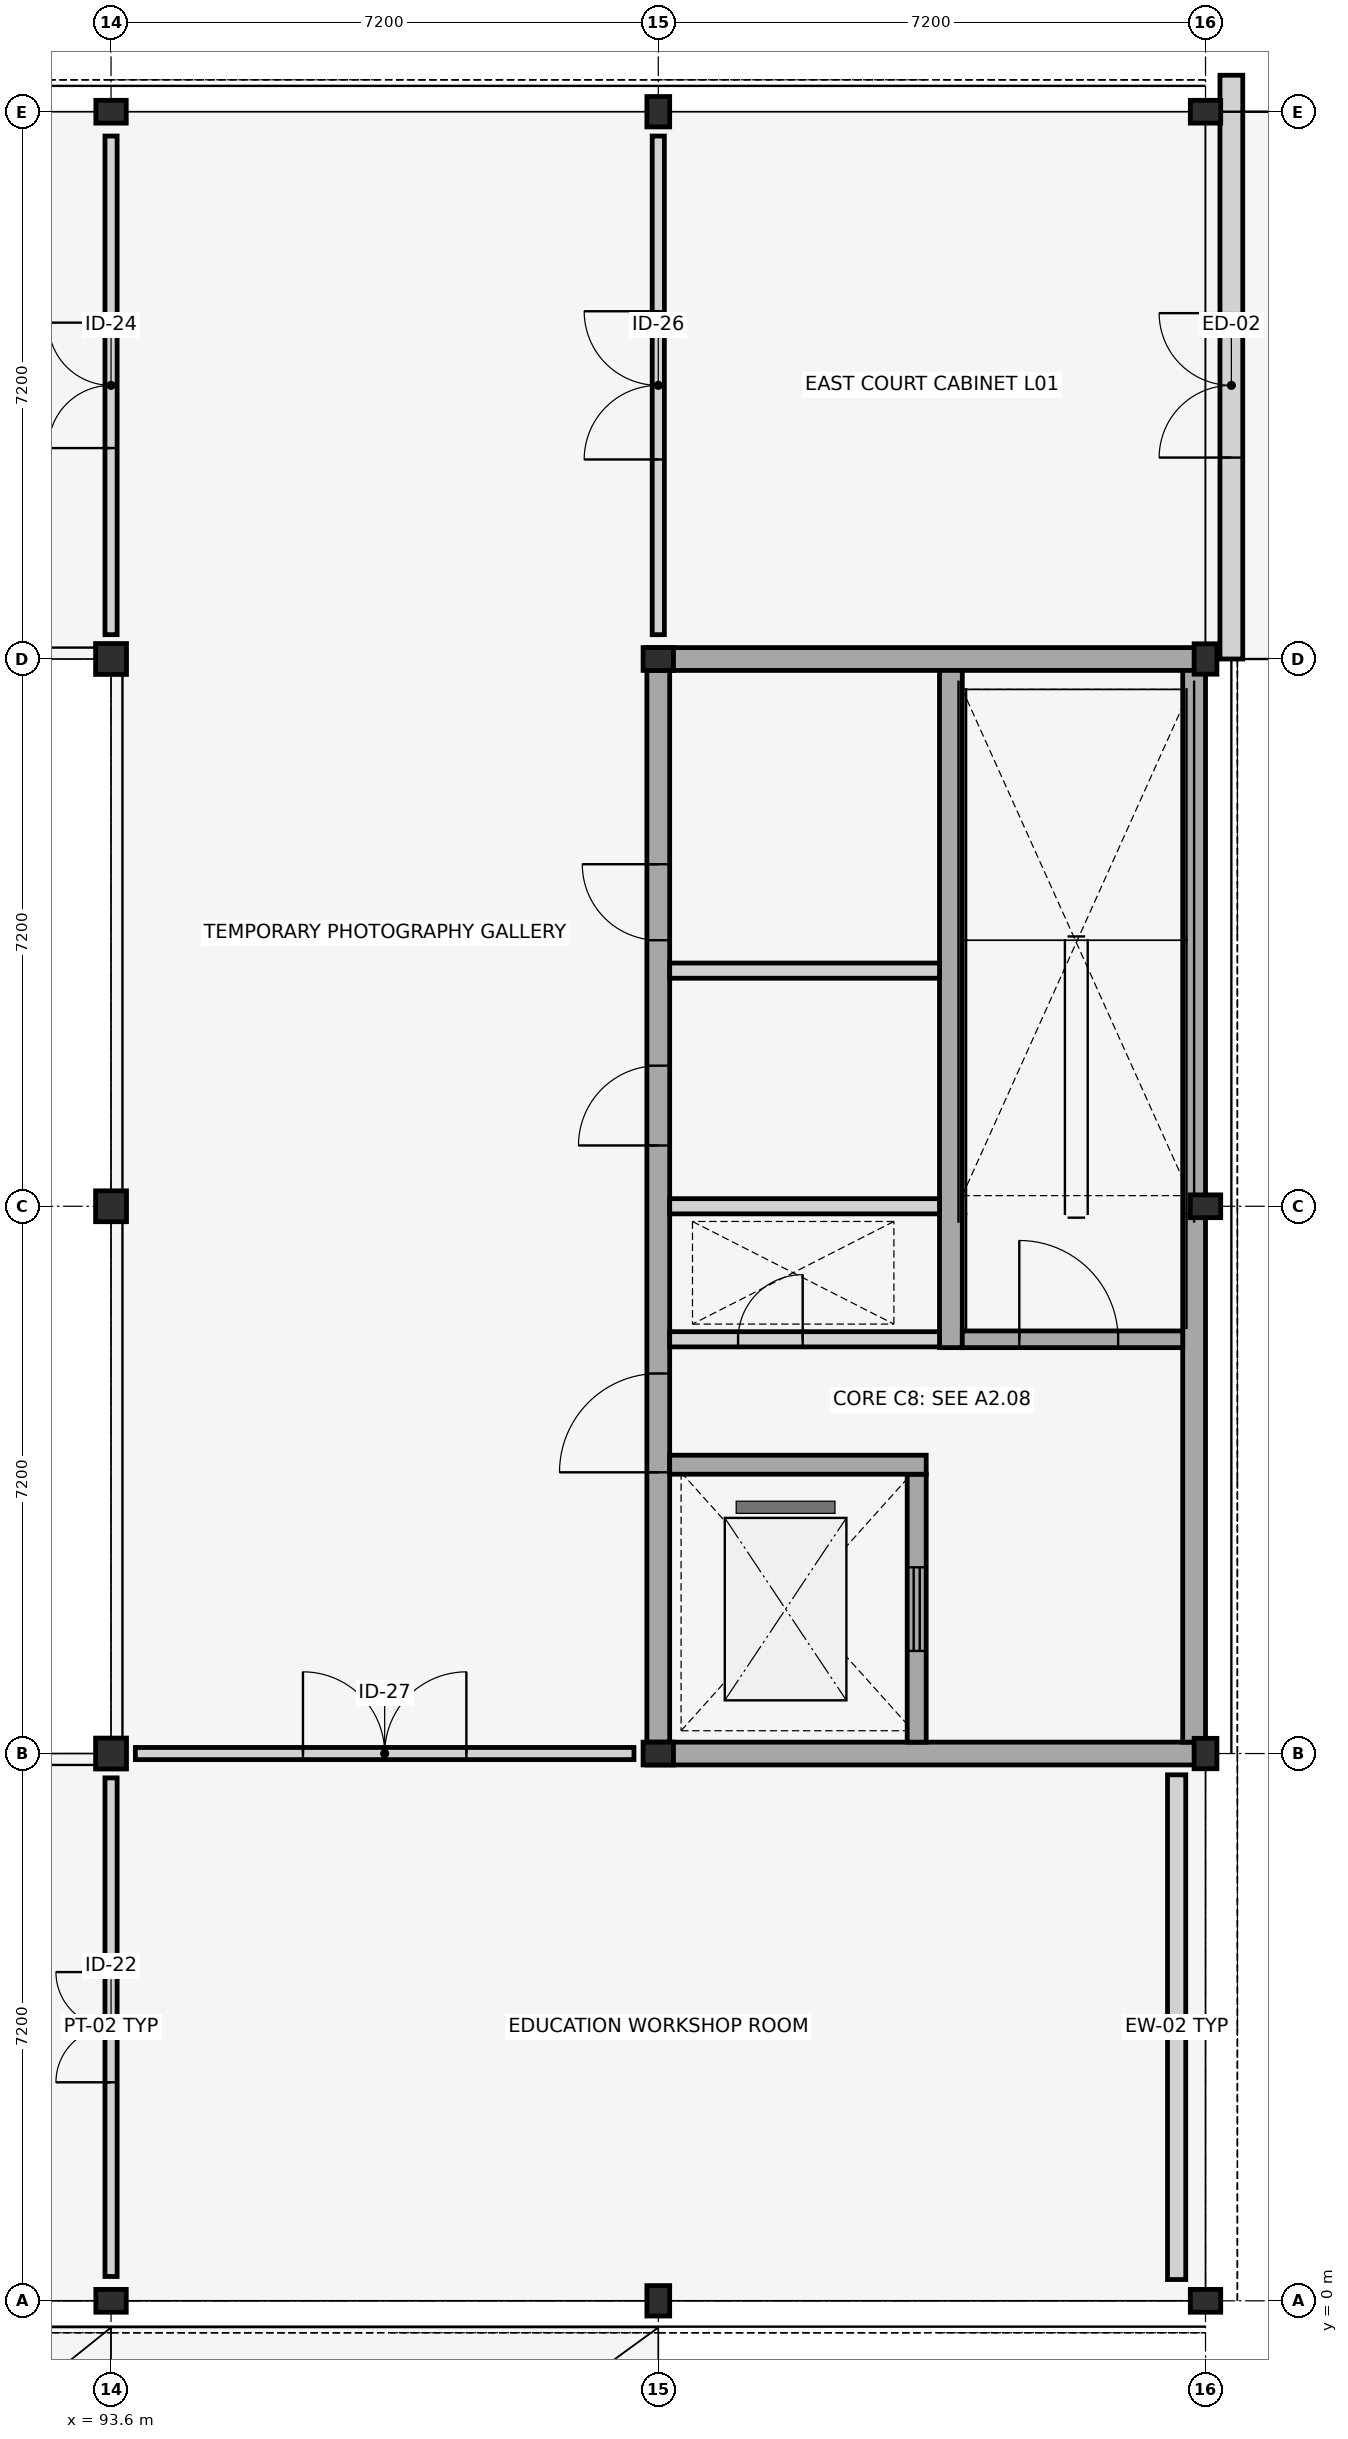
"""IFC4 building model, lengths in metres.
Left out: names, types, materials, properties, quantities, classifications, styles, units other than length and angle.
Written with IfcOpenShell. Run it as: python <this file> out.ifc"""

import sys

from ifc_helpers import new_model, si_unit, direction, frame, frame_2d, origin, origin_2d, place, context, subcontext, project, spatial, rectangle, hollow_circle, i_section, extrude, element, fill, save


model = new_model("IFC4")
c1 = context("Model", 3, precision=1e-05, world=origin(), true_north=direction((0.0, 1.0)))
c2 = subcontext(c1, "Body", "Model", "MODEL_VIEW")
j1 = project(units=[si_unit("LENGTHUNIT", "METRE"), si_unit("PLANEANGLEUNIT", "RADIAN")], contexts=[c1])
p1 = place(None, origin())
s1 = spatial("IfcSite", under=j1, at=p1, CompositionType="ELEMENT")
p2 = place(p1, origin())
s2 = spatial("IfcBuilding", under=s1, at=p2, CompositionType="ELEMENT")
p3 = place(p2, frame((0.0, 0.0, 4.5)))
s3 = spatial("IfcBuildingStorey", under=s2, at=p3, CompositionType="ELEMENT", Elevation=4.5)
p4 = place(p3, frame((93.6, 0.0, 0.0), z_axis=(0.0, 0.0, 1.0), x_axis=(0.0, 1.0, 0.0)))
e1 = element("IfcColumn", 1, at=p4, inside=s3, PredefinedType="COLUMN", context=c2, shape_type="SweptSolid", body=[
    extrude(i_section(OverallWidth=0.3, OverallDepth=0.4, WebThickness=0.013, FlangeThickness=0.024, FilletRadius=0.027, at=origin_2d()), origin(), (0.0, 0.0, 1.0), 4.2),
])
for number, where, z_axis, x_axis in (
    (2, (93.6, 7.2, 0.0), (0.0, 0.0, 1.0), (1.0, 0.0, 0.0)),
    (3, (93.6, 14.4, 0.0), (0.0, 0.0, 1.0), (0.0, 1.0, 0.0)),
    (4, (93.6, 21.6, 0.0), (0.0, 0.0, 1.0), (1.0, 0.0, 0.0)),
):
    element("IfcColumn", number, at=place(p3, frame(where, z_axis=z_axis, x_axis=x_axis)), inside=s3, PredefinedType="COLUMN", context=c2, shape_type="SweptSolid", body=[
        extrude(hollow_circle(Radius=0.203, WallThickness=0.016, at=origin_2d()), origin(), (0.0, 0.0, 1.0), 4.2),
    ])
for number, where, z_axis, x_axis in (
    (5, (93.6, 28.8, 0.0), (0.0, 0.0, 1.0), (0.0, 1.0, 0.0)),
    (6, (100.8, 0.0, 0.0), (0.0, 0.0, 1.0), (1.0, 0.0, 0.0)),
    (7, (100.8, 7.2, 0.0), (0.0, 0.0, 1.0), (0.0, 1.0, 0.0)),
    (8, (100.8, 21.6, 0.0), (0.0, 0.0, 1.0), (0.0, 1.0, 0.0)),
    (9, (100.8, 28.8, 0.0), (0.0, 0.0, 1.0), (1.0, 0.0, 0.0)),
    (10, (108.0, 0.0, 0.0), (0.0, 0.0, 1.0), (0.0, 1.0, 0.0)),
    (11, (108.0, 7.2, 0.0), (0.0, 0.0, 1.0), (1.0, 0.0, 0.0)),
    (12, (108.0, 14.4, 0.0), (0.0, 0.0, 1.0), (0.0, 1.0, 0.0)),
    (13, (108.0, 21.6, 0.0), (0.0, 0.0, 1.0), (1.0, 0.0, 0.0)),
    (14, (108.0, 28.8, 0.0), (0.0, 0.0, 1.0), (0.0, 1.0, 0.0)),
):
    element("IfcColumn", number, at=place(p3, frame(where, z_axis=z_axis, x_axis=x_axis)), inside=s3, PredefinedType="COLUMN", context=c2, shape_type="SweptSolid", body=[
        extrude(i_section(OverallWidth=0.3, OverallDepth=0.4, WebThickness=0.013, FlangeThickness=0.024, FilletRadius=0.027, at=origin_2d()), origin(), (0.0, 0.0, 1.0), 4.2),
    ])
p5 = place(p3, frame((107.62, 0.28, 0.0), z_axis=(0.0, 0.0, 1.0), x_axis=(0.0, 1.0, 0.0)))
e15 = element("IfcWall", 15, at=p5, inside=s3, PredefinedType="STANDARD", context=c2, shape_type="SweptSolid", body=[
    extrude(rectangle(XDim=6.64, YDim=0.24, at=frame_2d((3.32, 0.0))), origin(), (0.0, 0.0, 1.0), 3.58),
])
p6 = place(p3, frame((108.34, 21.6, 0.0), z_axis=(0.0, 0.0, 1.0), x_axis=(0.0, 1.0, 0.0)))
e16 = element("IfcWall", 16, at=p6, inside=s3, PredefinedType="STANDARD", context=c2, shape_type="SweptSolid", body=[
    extrude(rectangle(XDim=7.68, YDim=0.3, at=frame_2d((3.84, 0.0))), origin(), (0.0, 0.0, 1.0), 3.65),
])
p7 = place(p6, frame((2.65, 0.0, 0.0)))
e17 = element("IfcOpeningElement", 17, at=p7, cuts=e16, PredefinedType="OPENING", context=c2, shape_type="SweptSolid", body=[
    extrude(rectangle(XDim=1.9, YDim=2.45, at=frame_2d((0.95, 1.225))), frame((0.0, 0.16, 0.0), z_axis=(0.0, -1.0, 0.0), x_axis=(1.0, 0.0, 0.0)), (0.0, 0.0, 1.0), 0.32),
])
for number, where, z_axis, x_axis in (
    (18, (100.65, 7.2, 0.0), (0.0, 0.0, 1.0), (1.0, 0.0, 0.0)),
    (19, (100.65, 21.6, 0.0), (0.0, 0.0, 1.0), (1.0, 0.0, 0.0)),
):
    element("IfcWall", number, at=place(p3, frame(where, z_axis=z_axis, x_axis=x_axis)), inside=s3, PredefinedType="SHEAR", context=c2, shape_type="SweptSolid", body=[
        extrude(rectangle(XDim=7.35, YDim=0.3, at=frame_2d((3.675, 0.0))), origin(), (0.0, 0.0, 1.0), 3.98),
    ])
p8 = place(p3, frame((107.85, 7.35, 0.0), z_axis=(0.0, 0.0, 1.0), x_axis=(0.0, 1.0, 0.0)))
e20 = element("IfcWall", 20, at=p8, inside=s3, PredefinedType="SHEAR", context=c2, shape_type="SweptSolid", body=[
    extrude(rectangle(XDim=14.1, YDim=0.3, at=frame_2d((7.05, 0.0))), origin(), (0.0, 0.0, 1.0), 3.98),
])
p9 = place(p3, frame((100.8, 7.35, 0.0), z_axis=(0.0, 0.0, 1.0), x_axis=(0.0, 1.0, 0.0)))
e21 = element("IfcWall", 21, at=p9, inside=s3, PredefinedType="SHEAR", context=c2, shape_type="SweptSolid", body=[
    extrude(rectangle(XDim=14.1, YDim=0.3, at=frame_2d((7.05, 0.0))), origin(), (0.0, 0.0, 1.0), 3.98),
])
p10 = place(p9, frame((3.55, 0.0, 0.0)))
e22 = element("IfcOpeningElement", 22, at=p10, cuts=e21, PredefinedType="OPENING", context=c2, shape_type="SweptSolid", body=[
    extrude(rectangle(XDim=1.3, YDim=2.2, at=frame_2d((0.65, 1.1))), frame((0.0, 0.16, 0.0), z_axis=(0.0, -1.0, 0.0), x_axis=(1.0, 0.0, 0.0)), (0.0, 0.0, 1.0), 0.32),
])
p11 = place(p9, frame((7.85, 0.0, 0.0)))
e23 = element("IfcOpeningElement", 23, at=p11, cuts=e21, PredefinedType="OPENING", context=c2, shape_type="SweptSolid", body=[
    extrude(rectangle(XDim=1.05, YDim=2.15, at=frame_2d((0.525, 1.075))), frame((0.0, 0.16, 0.0), z_axis=(0.0, -1.0, 0.0), x_axis=(1.0, 0.0, 0.0)), (0.0, 0.0, 1.0), 0.32),
])
p12 = place(p9, frame((10.55, 0.0, 0.0)))
e24 = element("IfcOpeningElement", 24, at=p12, cuts=e21, PredefinedType="OPENING", context=c2, shape_type="SweptSolid", body=[
    extrude(rectangle(XDim=1.0, YDim=2.15, at=frame_2d((0.5, 1.075))), frame((0.0, 0.16, 0.0), z_axis=(0.0, -1.0, 0.0), x_axis=(1.0, 0.0, 0.0)), (0.0, 0.0, 1.0), 0.32),
])
p13 = place(p3, frame((104.2, 7.35, 0.0), z_axis=(0.0, 0.0, 1.0), x_axis=(0.0, 1.0, 0.0)))
e25 = element("IfcWall", 25, at=p13, inside=s3, PredefinedType="SHEAR", context=c2, shape_type="SweptSolid", body=[
    extrude(rectangle(XDim=3.525, YDim=0.25, at=frame_2d((1.762, 0.0))), origin(), (0.0, 0.0, 1.0), 3.98),
])
p14 = place(p13, frame((1.2, 0.0, 0.0)))
e26 = element("IfcOpeningElement", 26, at=p14, cuts=e25, PredefinedType="OPENING", context=c2, shape_type="SweptSolid", body=[
    extrude(rectangle(XDim=1.1, YDim=2.15, at=frame_2d((0.55, 1.075))), frame((0.0, 0.135, 0.0), z_axis=(0.0, -1.0, 0.0), x_axis=(1.0, 0.0, 0.0)), (0.0, 0.0, 1.0), 0.27),
])
p15 = place(p3, frame((104.65, 12.54, 0.0), z_axis=(0.0, 0.0, 1.0), x_axis=(0.0, 1.0, 0.0)))
e27 = element("IfcWall", 27, at=p15, inside=s3, PredefinedType="SHEAR", context=c2, shape_type="SweptSolid", body=[
    extrude(rectangle(XDim=8.91, YDim=0.3, at=frame_2d((4.455, 0.0))), origin(), (0.0, 0.0, 1.0), 3.98),
])
p16 = place(p3, frame((100.95, 12.65, 0.0), z_axis=(0.0, 0.0, 1.0), x_axis=(1.0, 0.0, 0.0)))
e28 = element("IfcWall", 28, at=p16, inside=s3, PredefinedType="PLUMBINGWALL", context=c2, shape_type="SweptSolid", body=[
    extrude(rectangle(XDim=3.55, YDim=0.2, at=frame_2d((1.775, 0.0))), origin(), (0.0, 0.0, 1.0), 3.4),
])
p17 = place(p16, frame((0.9, 0.0, 0.0)))
e29 = element("IfcOpeningElement", 29, at=p17, cuts=e28, PredefinedType="OPENING", context=c2, shape_type="SweptSolid", body=[
    extrude(rectangle(XDim=0.85, YDim=2.05, at=frame_2d((0.425, 1.025))), frame((0.0, 0.11, 0.0), z_axis=(0.0, -1.0, 0.0), x_axis=(1.0, 0.0, 0.0)), (0.0, 0.0, 1.0), 0.22),
])
p18 = place(p3, frame((104.8, 12.65, 0.0), z_axis=(0.0, 0.0, 1.0), x_axis=(1.0, 0.0, 0.0)))
e30 = element("IfcWall", 30, at=p18, inside=s3, PredefinedType="SHEAR", context=c2, shape_type="SweptSolid", body=[
    extrude(rectangle(XDim=2.9, YDim=0.22, at=frame_2d((1.45, 0.0))), origin(), (0.0, 0.0, 1.0), 3.98),
])
p19 = place(p18, frame((0.75, 0.0, 0.0)))
e31 = element("IfcOpeningElement", 31, at=p19, cuts=e30, PredefinedType="OPENING", context=c2, shape_type="SweptSolid", body=[
    extrude(rectangle(XDim=1.3, YDim=2.2, at=frame_2d((0.65, 1.1))), frame((0.0, 0.12, 0.0), z_axis=(0.0, -1.0, 0.0), x_axis=(1.0, 0.0, 0.0)), (0.0, 0.0, 1.0), 0.24),
])
p20 = place(p3, frame((100.95, 11.0, 0.0), z_axis=(0.0, 0.0, 1.0), x_axis=(1.0, 0.0, 0.0)))
e32 = element("IfcWall", 32, at=p20, inside=s3, PredefinedType="SHEAR", context=c2, shape_type="SweptSolid", body=[
    extrude(rectangle(XDim=3.375, YDim=0.25, at=frame_2d((1.688, 0.0))), origin(), (0.0, 0.0, 1.0), 3.98),
])
for number, where, z_axis, x_axis in (
    (33, (100.95, 14.4, 0.0), (0.0, 0.0, 1.0), (1.0, 0.0, 0.0)),
    (34, (100.95, 17.5, 0.0), (0.0, 0.0, 1.0), (1.0, 0.0, 0.0)),
):
    element("IfcWall", number, at=place(p3, frame(where, z_axis=z_axis, x_axis=x_axis)), inside=s3, PredefinedType="PLUMBINGWALL", context=c2, shape_type="SweptSolid", body=[
        extrude(rectangle(XDim=3.55, YDim=0.2, at=frame_2d((1.775, 0.0))), origin(), (0.0, 0.0, 1.0), 3.4),
    ])
p21 = place(p3, frame((93.6, 0.32, 0.0), z_axis=(0.0, 0.0, 1.0), x_axis=(0.0, 1.0, 0.0)))
e35 = element("IfcWall", 35, at=p21, inside=s3, PredefinedType="PARTITIONING", context=c2, shape_type="SweptSolid", body=[
    extrude(rectangle(XDim=6.56, YDim=0.16, at=frame_2d((3.28, 0.0))), origin(), (0.0, 0.0, 1.0), 3.15),
])
p22 = place(p21, frame((2.555, 0.0, 0.0)))
e36 = element("IfcOpeningElement", 36, at=p22, cuts=e35, PredefinedType="OPENING", context=c2, shape_type="SweptSolid", body=[
    extrude(rectangle(XDim=1.45, YDim=2.35, at=frame_2d((0.725, 1.175))), frame((0.0, 0.09, 0.0), z_axis=(0.0, -1.0, 0.0), x_axis=(1.0, 0.0, 0.0)), (0.0, 0.0, 1.0), 0.18),
])
p23 = place(p3, frame((93.6, 21.92, 0.0), z_axis=(0.0, 0.0, 1.0), x_axis=(0.0, 1.0, 0.0)))
e37 = element("IfcWall", 37, at=p23, inside=s3, PredefinedType="PARTITIONING", context=c2, shape_type="SweptSolid", body=[
    extrude(rectangle(XDim=6.56, YDim=0.16, at=frame_2d((3.28, 0.0))), origin(), (0.0, 0.0, 1.0), 3.15),
])
p24 = place(p23, frame((2.455, 0.0, 0.0)))
e38 = element("IfcOpeningElement", 38, at=p24, cuts=e37, PredefinedType="OPENING", context=c2, shape_type="SweptSolid", body=[
    extrude(rectangle(XDim=1.65, YDim=2.45, at=frame_2d((0.825, 1.225))), frame((0.0, 0.09, 0.0), z_axis=(0.0, -1.0, 0.0), x_axis=(1.0, 0.0, 0.0)), (0.0, 0.0, 1.0), 0.18),
])
p25 = place(p3, frame((100.8, 21.92, 0.0), z_axis=(0.0, 0.0, 1.0), x_axis=(0.0, 1.0, 0.0)))
e39 = element("IfcWall", 39, at=p25, inside=s3, PredefinedType="PARTITIONING", context=c2, shape_type="SweptSolid", body=[
    extrude(rectangle(XDim=6.56, YDim=0.16, at=frame_2d((3.28, 0.0))), origin(), (0.0, 0.0, 1.0), 3.15),
])
p26 = place(p25, frame((2.305, 0.0, 0.0)))
e40 = element("IfcOpeningElement", 40, at=p26, cuts=e39, PredefinedType="OPENING", context=c2, shape_type="SweptSolid", body=[
    extrude(rectangle(XDim=1.95, YDim=2.6, at=frame_2d((0.975, 1.3))), frame((0.0, 0.09, 0.0), z_axis=(0.0, -1.0, 0.0), x_axis=(1.0, 0.0, 0.0)), (0.0, 0.0, 1.0), 0.18),
])
p27 = place(p3, frame((93.92, 7.2, 0.0), z_axis=(0.0, 0.0, 1.0), x_axis=(1.0, 0.0, 0.0)))
e41 = element("IfcWall", 41, at=p27, inside=s3, PredefinedType="PARTITIONING", context=c2, shape_type="SweptSolid", body=[
    extrude(rectangle(XDim=6.56, YDim=0.16, at=frame_2d((3.28, 0.0))), origin(), (0.0, 0.0, 1.0), 3.15),
])
p28 = place(p27, frame((2.205, 0.0, 0.0)))
e42 = element("IfcOpeningElement", 42, at=p28, cuts=e41, PredefinedType="OPENING", context=c2, shape_type="SweptSolid", body=[
    extrude(rectangle(XDim=2.15, YDim=2.65, at=frame_2d((1.075, 1.325))), frame((0.0, 0.09, 0.0), z_axis=(0.0, -1.0, 0.0), x_axis=(1.0, 0.0, 0.0)), (0.0, 0.0, 1.0), 0.18),
])
p29 = place(p7, origin())
e43 = element("IfcDoor", 43, at=p29, inside=s3, OperationType="DOUBLE_DOOR_SINGLE_SWING", PredefinedType="DOOR", context=c2, shape_type="SweptSolid", body=[
    extrude(rectangle(XDim=1.9, YDim=2.45, at=frame_2d((0.95, 1.225))), frame((0.0, 0.025, 0.0), z_axis=(0.0, -1.0, 0.0), x_axis=(1.0, 0.0, 0.0)), (0.0, 0.0, 1.0), 0.05),
])
fill(e17, e43)
p30 = place(p10, origin())
e44 = element("IfcDoor", 44, at=p30, inside=s3, OperationType="SINGLE_SWING_LEFT", PredefinedType="DOOR", context=c2, shape_type="SweptSolid", body=[
    extrude(rectangle(XDim=1.3, YDim=2.2, at=frame_2d((0.65, 1.1))), frame((0.0, 0.025, 0.0), z_axis=(0.0, -1.0, 0.0), x_axis=(1.0, 0.0, 0.0)), (0.0, 0.0, 1.0), 0.05),
])
fill(e22, e44)
p31 = place(p11, origin())
e45 = element("IfcDoor", 45, at=p31, inside=s3, OperationType="SINGLE_SWING_LEFT", PredefinedType="DOOR", context=c2, shape_type="SweptSolid", body=[
    extrude(rectangle(XDim=1.05, YDim=2.15, at=frame_2d((0.525, 1.075))), frame((0.0, 0.025, 0.0), z_axis=(0.0, -1.0, 0.0), x_axis=(1.0, 0.0, 0.0)), (0.0, 0.0, 1.0), 0.05),
])
fill(e23, e45)
p32 = place(p12, origin())
e46 = element("IfcDoor", 46, at=p32, inside=s3, OperationType="SINGLE_SWING_RIGHT", PredefinedType="DOOR", context=c2, shape_type="SweptSolid", body=[
    extrude(rectangle(XDim=1.0, YDim=2.15, at=frame_2d((0.5, 1.075))), frame((0.0, 0.025, 0.0), z_axis=(0.0, -1.0, 0.0), x_axis=(1.0, 0.0, 0.0)), (0.0, 0.0, 1.0), 0.05),
])
fill(e24, e46)
p33 = place(p14, origin())
e47 = element("IfcDoor", 47, at=p33, inside=s3, OperationType="SLIDING_TO_LEFT", PredefinedType="DOOR", context=c2, shape_type="SweptSolid", body=[
    extrude(rectangle(XDim=1.1, YDim=2.15, at=frame_2d((0.55, 1.075))), frame((0.0, 0.025, 0.0), z_axis=(0.0, -1.0, 0.0), x_axis=(1.0, 0.0, 0.0)), (0.0, 0.0, 1.0), 0.05),
])
fill(e26, e47)
p34 = place(p17, origin())
e48 = element("IfcDoor", 48, at=p34, inside=s3, OperationType="SINGLE_SWING_RIGHT", PredefinedType="TRAPDOOR", context=c2, shape_type="SweptSolid", body=[
    extrude(rectangle(XDim=0.85, YDim=2.05, at=frame_2d((0.425, 1.025))), frame((0.0, 0.025, 0.0), z_axis=(0.0, -1.0, 0.0), x_axis=(1.0, 0.0, 0.0)), (0.0, 0.0, 1.0), 0.05),
])
fill(e29, e48)
p35 = place(p19, origin())
e49 = element("IfcDoor", 49, at=p35, inside=s3, OperationType="SINGLE_SWING_LEFT", PredefinedType="DOOR", context=c2, shape_type="SweptSolid", body=[
    extrude(rectangle(XDim=1.3, YDim=2.2, at=frame_2d((0.65, 1.1))), frame((0.0, 0.025, 0.0), z_axis=(0.0, -1.0, 0.0), x_axis=(1.0, 0.0, 0.0)), (0.0, 0.0, 1.0), 0.05),
])
fill(e31, e49)
p36 = place(p22, origin())
e50 = element("IfcDoor", 50, at=p36, inside=s3, OperationType="DOUBLE_DOOR_SINGLE_SWING", PredefinedType="DOOR", context=c2, shape_type="SweptSolid", body=[
    extrude(rectangle(XDim=1.45, YDim=2.35, at=frame_2d((0.725, 1.175))), frame((0.0, 0.025, 0.0), z_axis=(0.0, -1.0, 0.0), x_axis=(1.0, 0.0, 0.0)), (0.0, 0.0, 1.0), 0.05),
])
fill(e36, e50)
p37 = place(p24, origin())
e51 = element("IfcDoor", 51, at=p37, inside=s3, OperationType="DOUBLE_DOOR_SINGLE_SWING", PredefinedType="DOOR", context=c2, shape_type="SweptSolid", body=[
    extrude(rectangle(XDim=1.65, YDim=2.45, at=frame_2d((0.825, 1.225))), frame((0.0, 0.025, 0.0), z_axis=(0.0, -1.0, 0.0), x_axis=(1.0, 0.0, 0.0)), (0.0, 0.0, 1.0), 0.05),
])
fill(e38, e51)
p38 = place(p26, origin())
e52 = element("IfcDoor", 52, at=p38, inside=s3, OperationType="DOUBLE_DOOR_SINGLE_SWING", PredefinedType="DOOR", context=c2, shape_type="SweptSolid", body=[
    extrude(rectangle(XDim=1.95, YDim=2.6, at=frame_2d((0.975, 1.3))), frame((0.0, 0.025, 0.0), z_axis=(0.0, -1.0, 0.0), x_axis=(1.0, 0.0, 0.0)), (0.0, 0.0, 1.0), 0.05),
])
fill(e40, e52)
p39 = place(p28, origin())
e53 = element("IfcDoor", 53, at=p39, inside=s3, OperationType="DOUBLE_DOOR_SINGLE_SWING", PredefinedType="DOOR", context=c2, shape_type="SweptSolid", body=[
    extrude(rectangle(XDim=2.15, YDim=2.65, at=frame_2d((1.075, 1.325))), frame((0.0, 0.025, 0.0), z_axis=(0.0, -1.0, 0.0), x_axis=(1.0, 0.0, 0.0)), (0.0, 0.0, 1.0), 0.05),
])
fill(e42, e53)
save(model, sys.argv[1])
